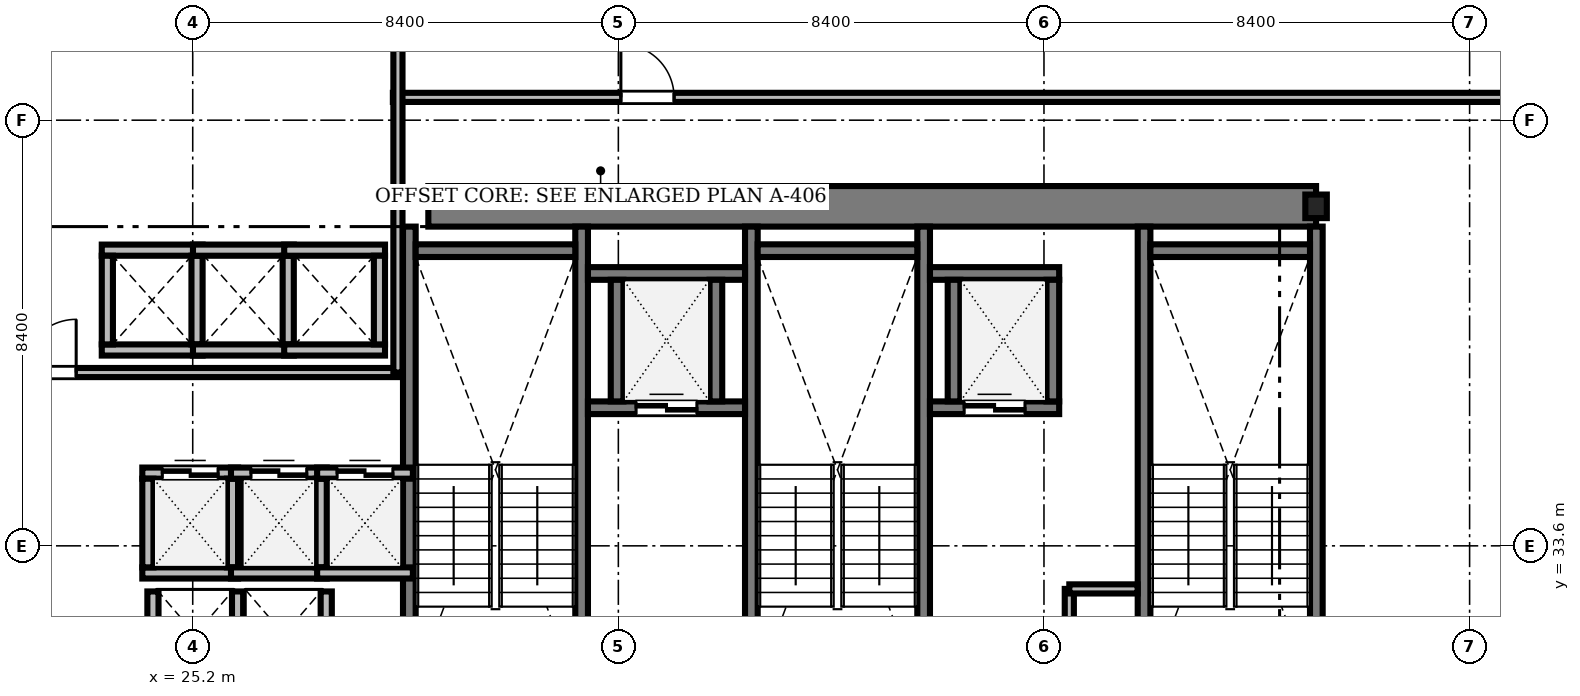
"""IFC4 building model, lengths in metres.
Left out: names, types, materials, properties, quantities, classifications, styles, units other than length and angle.
Written with IfcOpenShell. Run it as: python <this file> out.ifc"""

import sys

from ifc_helpers import new_model, si_unit, direction, frame, frame_2d, origin, origin_2d, place, context, subcontext, project, spatial, rectangle, i_section, extrude, source, transform, mapped, element, fill, save


model = new_model("IFC4")
c1 = context("Model", 3, precision=1e-05, world=origin(), true_north=direction((0.0, 1.0)))
c2 = subcontext(c1, "Body", "Model", "MODEL_VIEW")
j1 = project(units=[si_unit("LENGTHUNIT", "METRE"), si_unit("PLANEANGLEUNIT", "RADIAN")], contexts=[c1])
p1 = place(None, origin())
s1 = spatial("IfcSite", under=j1, at=p1, CompositionType="ELEMENT")
p2 = place(p1, origin())
s2 = spatial("IfcBuilding", under=s1, at=p2, CompositionType="ELEMENT")
p3 = place(p2, frame((0.0, 0.0, 103.7)))
s3 = spatial("IfcBuildingStorey", under=s2, at=p3, CompositionType="ELEMENT", Elevation=103.7)
m1 = source(origin(), c2, "Body", "SweptSolid", [
    extrude(rectangle(XDim=17.52, YDim=0.8, at=frame_2d((8.76, 0.0))), origin(), (0.0, 0.0, 1.0), 3.56),
])
p4 = place(p3, frame((29.85, 40.3, 0.0), z_axis=(0.0, 0.0, 1.0), x_axis=(1.0, 0.0, 0.0)))
e1 = element("IfcWall", 1, at=p4, inside=s3, PredefinedType="SHEAR", context=c2, shape_type="MappedRepresentation", body=[
    mapped(m1, transform((0.0, 0.0, 0.0), scale=1.0)),
])
m2 = source(origin(), c2, "Body", "SweptSolid", [
    extrude(i_section(OverallWidth=0.424, OverallDepth=0.465, WebThickness=0.035, FlangeThickness=0.056, FilletRadius=0.015, at=origin_2d()), origin(), (0.0, 0.0, 1.0), 3.56),
])
p5 = place(p3, frame((47.37, 40.3, 0.0), z_axis=(0.0, 0.0, 1.0), x_axis=(1.0, 0.0, 0.0)))
e2 = element("IfcColumn", 2, at=p5, inside=s3, PredefinedType="COLUMN", context=c2, shape_type="MappedRepresentation", body=[
    mapped(m2, transform((0.0, 0.0, 0.0), scale=1.0)),
])
m3 = source(origin(), c2, "Body", "SweptSolid", [
    extrude(rectangle(XDim=9.25, YDim=0.25, at=frame_2d((4.625, 0.0))), origin(), (0.0, 0.0, 1.0), 3.6),
])
for number, where, z_axis, x_axis in (
    (3, (29.475, 30.65, 0.0), (0.0, 0.0, 1.0), (0.0, 1.0, 0.0)),
    (4, (32.875, 30.65, 0.0), (0.0, 0.0, 1.0), (0.0, 1.0, 0.0)),
):
    element("IfcWall", number, at=place(p3, frame(where, z_axis=z_axis, x_axis=x_axis)), inside=s3, PredefinedType="SOLIDWALL", context=c2, shape_type="MappedRepresentation", body=[
        mapped(m3, transform((0.0, 0.0, 0.0), scale=1.0)),
    ])
m4 = source(origin(), c2, "Body", "SweptSolid", [
    extrude(rectangle(XDim=3.15, YDim=0.25, at=frame_2d((1.575, 0.0))), origin(), (0.0, 0.0, 1.0), 3.6),
])
p6 = place(p3, frame((29.6, 39.425, 0.0), z_axis=(0.0, 0.0, 1.0), x_axis=(1.0, 0.0, 0.0)))
e5 = element("IfcWall", 5, at=p6, inside=s3, PredefinedType="SOLIDWALL", context=c2, shape_type="MappedRepresentation", body=[
    mapped(m4, transform((0.0, 0.0, 0.0), scale=1.0)),
])
for number, where, z_axis, x_axis in (
    (6, (36.225, 30.65, 0.0), (0.0, 0.0, 1.0), (0.0, 1.0, 0.0)),
    (7, (39.625, 30.65, 0.0), (0.0, 0.0, 1.0), (0.0, 1.0, 0.0)),
):
    element("IfcWall", number, at=place(p3, frame(where, z_axis=z_axis, x_axis=x_axis)), inside=s3, PredefinedType="SOLIDWALL", context=c2, shape_type="MappedRepresentation", body=[
        mapped(m3, transform((0.0, 0.0, 0.0), scale=1.0)),
    ])
p7 = place(p3, frame((36.35, 39.425, 0.0), z_axis=(0.0, 0.0, 1.0), x_axis=(1.0, 0.0, 0.0)))
e8 = element("IfcWall", 8, at=p7, inside=s3, PredefinedType="SOLIDWALL", context=c2, shape_type="MappedRepresentation", body=[
    mapped(m4, transform((0.0, 0.0, 0.0), scale=1.0)),
])
for number, where, z_axis, x_axis in (
    (9, (43.975, 30.65, 0.0), (0.0, 0.0, 1.0), (0.0, 1.0, 0.0)),
    (10, (47.375, 30.65, 0.0), (0.0, 0.0, 1.0), (0.0, 1.0, 0.0)),
):
    element("IfcWall", number, at=place(p3, frame(where, z_axis=z_axis, x_axis=x_axis)), inside=s3, PredefinedType="SOLIDWALL", context=c2, shape_type="MappedRepresentation", body=[
        mapped(m3, transform((0.0, 0.0, 0.0), scale=1.0)),
    ])
p8 = place(p3, frame((44.1, 39.425, 0.0), z_axis=(0.0, 0.0, 1.0), x_axis=(1.0, 0.0, 0.0)))
e11 = element("IfcWall", 11, at=p8, inside=s3, PredefinedType="SOLIDWALL", context=c2, shape_type="MappedRepresentation", body=[
    mapped(m4, transform((0.0, 0.0, 0.0), scale=1.0)),
])
m5 = source(origin(), c2, "Body", "SweptSolid", [
    extrude(rectangle(XDim=1.99, YDim=0.22, at=frame_2d((0.995, 0.0))), origin(), (0.0, 0.0, 1.0), 3.56),
])
for number, where, z_axis, x_axis in (
    (12, (23.405, 37.465, 0.0), (0.0, 0.0, 1.0), (1.0, 0.0, 0.0)),
    (13, (23.405, 39.435, 0.0), (0.0, 0.0, 1.0), (1.0, 0.0, 0.0)),
):
    element("IfcWall", number, at=place(p3, frame(where, z_axis=z_axis, x_axis=x_axis)), inside=s3, PredefinedType="SOLIDWALL", context=c2, shape_type="MappedRepresentation", body=[
        mapped(m5, transform((0.0, 0.0, 0.0), scale=1.0)),
    ])
m6 = source(origin(), c2, "Body", "SweptSolid", [
    extrude(rectangle(XDim=1.75, YDim=0.22, at=frame_2d((0.875, 0.0))), origin(), (0.0, 0.0, 1.0), 3.56),
])
for number, where, z_axis, x_axis in (
    (14, (23.515, 37.575, 0.0), (0.0, 0.0, 1.0), (0.0, 1.0, 0.0)),
    (15, (25.285, 37.575, 0.0), (0.0, 0.0, 1.0), (0.0, 1.0, 0.0)),
):
    element("IfcWall", number, at=place(p3, frame(where, z_axis=z_axis, x_axis=x_axis)), inside=s3, PredefinedType="SOLIDWALL", context=c2, shape_type="MappedRepresentation", body=[
        mapped(m6, transform((0.0, 0.0, 0.0), scale=1.0)),
    ])
for number, where, z_axis, x_axis in (
    (16, (25.205, 37.465, 0.0), (0.0, 0.0, 1.0), (1.0, 0.0, 0.0)),
    (17, (25.205, 39.435, 0.0), (0.0, 0.0, 1.0), (1.0, 0.0, 0.0)),
):
    element("IfcWall", number, at=place(p3, frame(where, z_axis=z_axis, x_axis=x_axis)), inside=s3, PredefinedType="SOLIDWALL", context=c2, shape_type="MappedRepresentation", body=[
        mapped(m5, transform((0.0, 0.0, 0.0), scale=1.0)),
    ])
p9 = place(p3, frame((27.085, 37.575, 0.0), z_axis=(0.0, 0.0, 1.0), x_axis=(0.0, 1.0, 0.0)))
e18 = element("IfcWall", 18, at=p9, inside=s3, PredefinedType="SOLIDWALL", context=c2, shape_type="MappedRepresentation", body=[
    mapped(m6, transform((0.0, 0.0, 0.0), scale=1.0)),
])
m7 = source(origin(), c2, "Body", "SweptSolid", [
    extrude(rectangle(XDim=1.99, YDim=0.22, at=frame_2d((0.995, 0.0))), origin(), (0.0, 0.0, 1.0), 3.56),
])
for number, where, z_axis, x_axis in (
    (19, (27.005, 37.465, 0.0), (0.0, 0.0, 1.0), (1.0, 0.0, 0.0)),
    (20, (27.005, 39.435, 0.0), (0.0, 0.0, 1.0), (1.0, 0.0, 0.0)),
):
    element("IfcWall", number, at=place(p3, frame(where, z_axis=z_axis, x_axis=x_axis)), inside=s3, PredefinedType="SOLIDWALL", context=c2, shape_type="MappedRepresentation", body=[
        mapped(m7, transform((0.0, 0.0, 0.0), scale=1.0)),
    ])
p10 = place(p3, frame((28.885, 37.575, 0.0), z_axis=(0.0, 0.0, 1.0), x_axis=(0.0, 1.0, 0.0)))
e21 = element("IfcWall", 21, at=p10, inside=s3, PredefinedType="SOLIDWALL", context=c2, shape_type="MappedRepresentation", body=[
    mapped(m6, transform((0.0, 0.0, 0.0), scale=1.0)),
])
m8 = source(origin(), c2, "Body", "SweptSolid", [
    extrude(rectangle(XDim=1.89, YDim=0.22, at=frame_2d((0.945, 0.0))), origin(), (0.0, 0.0, 1.0), 3.56),
])
p11 = place(p3, frame((24.205, 33.065, 0.0), z_axis=(0.0, 0.0, 1.0), x_axis=(1.0, 0.0, 0.0)))
e22 = element("IfcWall", 22, at=p11, inside=s3, PredefinedType="SOLIDWALL", context=c2, shape_type="MappedRepresentation", body=[
    mapped(m8, transform((0.0, 0.0, 0.0), scale=1.0)),
])
p12 = place(p3, frame((24.205, 35.035, 0.0), z_axis=(0.0, 0.0, 1.0), x_axis=(1.0, 0.0, 0.0)))
e23 = element("IfcWall", 23, at=p12, inside=s3, PredefinedType="SOLIDWALL", context=c2, shape_type="MappedRepresentation", body=[
    mapped(m8, transform((0.0, 0.0, 0.0), scale=1.0)),
])
m9 = source(origin(), c2, "Body", "SweptSolid", [
    extrude(rectangle(XDim=1.1, YDim=2.2, at=frame_2d((0.55, 1.1))), frame((0.0, 0.12, 0.0), z_axis=(0.0, -1.0, 0.0), x_axis=(1.0, 0.0, 0.0)), (0.0, 0.0, 1.0), 0.24),
])
p13 = place(p12, frame((0.395, 0.0, 0.0)))
e24 = element("IfcOpeningElement", 24, at=p13, cuts=e23, PredefinedType="OPENING", context=c2, shape_type="MappedRepresentation", body=[
    mapped(m9, transform((0.0, 0.0, 0.0), scale=1.0)),
])
for number, where, z_axis, x_axis in (
    (25, (24.315, 33.175, 0.0), (0.0, 0.0, 1.0), (0.0, 1.0, 0.0)),
    (26, (25.985, 33.175, 0.0), (0.0, 0.0, 1.0), (0.0, 1.0, 0.0)),
):
    element("IfcWall", number, at=place(p3, frame(where, z_axis=z_axis, x_axis=x_axis)), inside=s3, PredefinedType="SOLIDWALL", context=c2, shape_type="MappedRepresentation", body=[
        mapped(m6, transform((0.0, 0.0, 0.0), scale=1.0)),
    ])
p14 = place(p3, frame((25.955, 33.065, 0.0), z_axis=(0.0, 0.0, 1.0), x_axis=(1.0, 0.0, 0.0)))
e27 = element("IfcWall", 27, at=p14, inside=s3, PredefinedType="SOLIDWALL", context=c2, shape_type="MappedRepresentation", body=[
    mapped(m8, transform((0.0, 0.0, 0.0), scale=1.0)),
])
p15 = place(p3, frame((25.955, 35.035, 0.0), z_axis=(0.0, 0.0, 1.0), x_axis=(1.0, 0.0, 0.0)))
e28 = element("IfcWall", 28, at=p15, inside=s3, PredefinedType="SOLIDWALL", context=c2, shape_type="MappedRepresentation", body=[
    mapped(m8, transform((0.0, 0.0, 0.0), scale=1.0)),
])
p16 = place(p15, frame((0.395, 0.0, 0.0)))
e29 = element("IfcOpeningElement", 29, at=p16, cuts=e28, PredefinedType="OPENING", context=c2, shape_type="MappedRepresentation", body=[
    mapped(m9, transform((0.0, 0.0, 0.0), scale=1.0)),
])
p17 = place(p3, frame((27.735, 33.175, 0.0), z_axis=(0.0, 0.0, 1.0), x_axis=(0.0, 1.0, 0.0)))
e30 = element("IfcWall", 30, at=p17, inside=s3, PredefinedType="SOLIDWALL", context=c2, shape_type="MappedRepresentation", body=[
    mapped(m6, transform((0.0, 0.0, 0.0), scale=1.0)),
])
p18 = place(p3, frame((27.655, 33.065, 0.0), z_axis=(0.0, 0.0, 1.0), x_axis=(1.0, 0.0, 0.0)))
e31 = element("IfcWall", 31, at=p18, inside=s3, PredefinedType="SOLIDWALL", context=c2, shape_type="MappedRepresentation", body=[
    mapped(m8, transform((0.0, 0.0, 0.0), scale=1.0)),
])
p19 = place(p3, frame((27.655, 35.035, 0.0), z_axis=(0.0, 0.0, 1.0), x_axis=(1.0, 0.0, 0.0)))
e32 = element("IfcWall", 32, at=p19, inside=s3, PredefinedType="SOLIDWALL", context=c2, shape_type="MappedRepresentation", body=[
    mapped(m8, transform((0.0, 0.0, 0.0), scale=1.0)),
])
p20 = place(p19, frame((0.395, 0.0, 0.0)))
e33 = element("IfcOpeningElement", 33, at=p20, cuts=e32, PredefinedType="OPENING", context=c2, shape_type="MappedRepresentation", body=[
    mapped(m9, transform((0.0, 0.0, 0.0), scale=1.0)),
])
m10 = source(origin(), c2, "Body", "SweptSolid", [
    extrude(rectangle(XDim=3.1, YDim=0.25, at=frame_2d((1.55, 0.0))), origin(), (0.0, 0.0, 1.0), 3.56),
])
p21 = place(p3, frame((33.0, 36.325, 0.0), z_axis=(0.0, 0.0, 1.0), x_axis=(1.0, 0.0, 0.0)))
e34 = element("IfcWall", 34, at=p21, inside=s3, PredefinedType="SOLIDWALL", context=c2, shape_type="MappedRepresentation", body=[
    mapped(m10, transform((0.0, 0.0, 0.0), scale=1.0)),
])
m11 = source(origin(), c2, "Body", "SweptSolid", [
    extrude(rectangle(XDim=1.2, YDim=2.25, at=frame_2d((0.6, 1.125))), frame((0.0, 0.135, 0.0), z_axis=(0.0, -1.0, 0.0), x_axis=(1.0, 0.0, 0.0)), (0.0, 0.0, 1.0), 0.27),
])
p22 = place(p21, frame((0.95, 0.0, 0.0)))
e35 = element("IfcOpeningElement", 35, at=p22, cuts=e34, PredefinedType="OPENING", context=c2, shape_type="MappedRepresentation", body=[
    mapped(m11, transform((0.0, 0.0, 0.0), scale=1.0)),
])
p23 = place(p3, frame((33.0, 38.975, 0.0), z_axis=(0.0, 0.0, 1.0), x_axis=(1.0, 0.0, 0.0)))
e36 = element("IfcWall", 36, at=p23, inside=s3, PredefinedType="SOLIDWALL", context=c2, shape_type="MappedRepresentation", body=[
    mapped(m10, transform((0.0, 0.0, 0.0), scale=1.0)),
])
m12 = source(origin(), c2, "Body", "SweptSolid", [
    extrude(rectangle(XDim=2.4, YDim=0.25, at=frame_2d((1.2, 0.0))), origin(), (0.0, 0.0, 1.0), 3.56),
])
for number, where, z_axis, x_axis in (
    (37, (33.575, 36.45, 0.0), (0.0, 0.0, 1.0), (0.0, 1.0, 0.0)),
    (38, (35.525, 36.45, 0.0), (0.0, 0.0, 1.0), (0.0, 1.0, 0.0)),
):
    element("IfcWall", number, at=place(p3, frame(where, z_axis=z_axis, x_axis=x_axis)), inside=s3, PredefinedType="SOLIDWALL", context=c2, shape_type="MappedRepresentation", body=[
        mapped(m12, transform((0.0, 0.0, 0.0), scale=1.0)),
    ])
m13 = source(origin(), c2, "Body", "SweptSolid", [
    extrude(rectangle(XDim=2.55, YDim=0.25, at=frame_2d((1.275, 0.0))), origin(), (0.0, 0.0, 1.0), 3.56),
])
p24 = place(p3, frame((39.75, 36.325, 0.0), z_axis=(0.0, 0.0, 1.0), x_axis=(1.0, 0.0, 0.0)))
e39 = element("IfcWall", 39, at=p24, inside=s3, PredefinedType="SOLIDWALL", context=c2, shape_type="MappedRepresentation", body=[
    mapped(m13, transform((0.0, 0.0, 0.0), scale=1.0)),
])
p25 = place(p24, frame((0.675, 0.0, 0.0)))
e40 = element("IfcOpeningElement", 40, at=p25, cuts=e39, PredefinedType="OPENING", context=c2, shape_type="MappedRepresentation", body=[
    mapped(m11, transform((0.0, 0.0, 0.0), scale=1.0)),
])
p26 = place(p3, frame((39.75, 38.975, 0.0), z_axis=(0.0, 0.0, 1.0), x_axis=(1.0, 0.0, 0.0)))
e41 = element("IfcWall", 41, at=p26, inside=s3, PredefinedType="SOLIDWALL", context=c2, shape_type="MappedRepresentation", body=[
    mapped(m13, transform((0.0, 0.0, 0.0), scale=1.0)),
])
for number, where, z_axis, x_axis in (
    (42, (40.225, 36.45, 0.0), (0.0, 0.0, 1.0), (0.0, 1.0, 0.0)),
    (43, (42.175, 36.45, 0.0), (0.0, 0.0, 1.0), (0.0, 1.0, 0.0)),
):
    element("IfcWall", number, at=place(p3, frame(where, z_axis=z_axis, x_axis=x_axis)), inside=s3, PredefinedType="SOLIDWALL", context=c2, shape_type="MappedRepresentation", body=[
        mapped(m12, transform((0.0, 0.0, 0.0), scale=1.0)),
    ])
m14 = source(origin(), c2, "Body", "SweptSolid", [
    extrude(rectangle(XDim=1.7, YDim=0.22, at=frame_2d((0.85, 0.0))), origin(), (0.0, 0.0, 1.0), 3.56),
])
for number, where, z_axis, x_axis in (
    (44, (24.415, 31.0, 0.0), (0.0, 0.0, 1.0), (0.0, 1.0, 0.0)),
    (45, (26.085, 31.0, 0.0), (0.0, 0.0, 1.0), (0.0, 1.0, 0.0)),
    (46, (27.835, 31.0, 0.0), (0.0, 0.0, 1.0), (0.0, 1.0, 0.0)),
):
    element("IfcWall", number, at=place(p3, frame(where, z_axis=z_axis, x_axis=x_axis)), inside=s3, PredefinedType="SOLIDWALL", context=c2, shape_type="MappedRepresentation", body=[
        mapped(m14, transform((0.0, 0.0, 0.0), scale=1.0)),
    ])
m15 = source(origin(), c2, "Body", "SweptSolid", [
    extrude(rectangle(XDim=23.928, YDim=0.18, at=frame_2d((11.964, 0.0))), origin(), (0.0, 0.0, 1.0), 2.802),
])
p27 = place(p3, frame((29.15, 42.45, 0.0), z_axis=(0.0, 0.0, 1.0), x_axis=(1.0, 0.0, 0.0)))
e47 = element("IfcWall", 47, at=p27, inside=s3, PredefinedType="PARTITIONING", context=c2, shape_type="MappedRepresentation", body=[
    mapped(m15, transform((0.0, 0.0, 0.0), scale=1.0)),
])
m16 = source(origin(), c2, "Body", "SweptSolid", [
    extrude(rectangle(XDim=1.05, YDim=2.2, at=frame_2d((0.525, 1.1))), frame((0.0, 0.1, 0.0), z_axis=(0.0, -1.0, 0.0), x_axis=(1.0, 0.0, 0.0)), (0.0, 0.0, 1.0), 0.2),
])
p28 = place(p27, frame((4.5, 0.0, 0.0)))
e48 = element("IfcOpeningElement", 48, at=p28, cuts=e47, PredefinedType="OPENING", context=c2, shape_type="MappedRepresentation", body=[
    mapped(m16, transform((0.0, 0.0, 0.0), scale=1.0)),
])
m17 = source(origin(), c2, "Body", "SweptSolid", [
    extrude(rectangle(XDim=22.328, YDim=0.18, at=frame_2d((11.164, 0.0))), origin(), (0.0, 0.0, 1.0), 2.802),
])
p29 = place(p3, frame((6.922, 37.02, 0.0), z_axis=(0.0, 0.0, 1.0), x_axis=(1.0, 0.0, 0.0)))
e49 = element("IfcWall", 49, at=p29, inside=s3, PredefinedType="PARTITIONING", context=c2, shape_type="MappedRepresentation", body=[
    mapped(m17, transform((0.0, 0.0, 0.0), scale=1.0)),
])
p30 = place(p29, frame((14.928, 0.0, 0.0)))
e50 = element("IfcOpeningElement", 50, at=p30, cuts=e49, PredefinedType="OPENING", context=c2, shape_type="MappedRepresentation", body=[
    mapped(m16, transform((0.0, 0.0, 0.0), scale=1.0)),
])
m18 = source(origin(), c2, "Body", "SweptSolid", [
    extrude(rectangle(XDim=11.45, YDim=0.18, at=frame_2d((5.725, 0.0))), origin(), (0.0, 0.0, 1.0), 2.802),
])
p31 = place(p3, frame((29.25, 37.02, 0.0), z_axis=(0.0, 0.0, 1.0), x_axis=(0.0, 1.0, 0.0)))
e51 = element("IfcWall", 51, at=p31, inside=s3, PredefinedType="PARTITIONING", context=c2, shape_type="MappedRepresentation", body=[
    mapped(m18, transform((0.0, 0.0, 0.0), scale=1.0)),
])
m19 = source(origin(), c2, "Body", "SweptSolid", [
    extrude(rectangle(XDim=1.858, YDim=0.18, at=frame_2d((0.929, 0.0))), origin(), (0.0, 0.0, 1.0), 3.56),
])
p32 = place(p3, frame((42.5, 30.892, 0.0), z_axis=(0.0, 0.0, 1.0), x_axis=(0.0, 1.0, 0.0)))
e52 = element("IfcWall", 52, at=p32, inside=s3, PredefinedType="PARTITIONING", context=c2, shape_type="MappedRepresentation", body=[
    mapped(m19, transform((0.0, 0.0, 0.0), scale=1.0)),
])
m20 = source(origin(), c2, "Body", "SweptSolid", [
    extrude(rectangle(XDim=1.348, YDim=0.18, at=frame_2d((0.674, 0.0))), origin(), (0.0, 0.0, 1.0), 3.56),
])
p33 = place(p3, frame((42.5, 32.75, 0.0), z_axis=(0.0, 0.0, 1.0), x_axis=(1.0, 0.0, 0.0)))
e53 = element("IfcWall", 53, at=p33, inside=s3, PredefinedType="PARTITIONING", context=c2, shape_type="MappedRepresentation", body=[
    mapped(m20, transform((0.0, 0.0, 0.0), scale=1.0)),
])
m21 = source(origin(), c2, "Body", "SweptSolid", [
    extrude(rectangle(XDim=1.1, YDim=2.2, at=frame_2d((0.55, 1.1))), frame((0.0, 0.025, 0.0), z_axis=(0.0, -1.0, 0.0), x_axis=(1.0, 0.0, 0.0)), (0.0, 0.0, 1.0), 0.05),
])
p34 = place(p13, origin())
e54 = element("IfcDoor", 54, at=p34, inside=s3, OperationType="DOUBLE_DOOR_SLIDING", PredefinedType="DOOR", context=c2, shape_type="MappedRepresentation", body=[
    mapped(m21, transform((0.0, 0.0, 0.0), scale=1.0)),
])
fill(e24, e54)
p35 = place(p16, origin())
e55 = element("IfcDoor", 55, at=p35, inside=s3, OperationType="DOUBLE_DOOR_SLIDING", PredefinedType="DOOR", context=c2, shape_type="MappedRepresentation", body=[
    mapped(m21, transform((0.0, 0.0, 0.0), scale=1.0)),
])
fill(e29, e55)
p36 = place(p20, origin())
e56 = element("IfcDoor", 56, at=p36, inside=s3, OperationType="DOUBLE_DOOR_SLIDING", PredefinedType="DOOR", context=c2, shape_type="MappedRepresentation", body=[
    mapped(m21, transform((0.0, 0.0, 0.0), scale=1.0)),
])
fill(e33, e56)
m22 = source(origin(), c2, "Body", "SweptSolid", [
    extrude(rectangle(XDim=1.2, YDim=2.25, at=frame_2d((0.6, 1.125))), frame((0.0, 0.025, 0.0), z_axis=(0.0, -1.0, 0.0), x_axis=(1.0, 0.0, 0.0)), (0.0, 0.0, 1.0), 0.05),
])
p37 = place(p22, origin())
e57 = element("IfcDoor", 57, at=p37, inside=s3, OperationType="DOUBLE_DOOR_SLIDING", PredefinedType="DOOR", context=c2, shape_type="MappedRepresentation", body=[
    mapped(m22, transform((0.0, 0.0, 0.0), scale=1.0)),
])
fill(e35, e57)
p38 = place(p25, origin())
e58 = element("IfcDoor", 58, at=p38, inside=s3, OperationType="DOUBLE_DOOR_SLIDING", PredefinedType="DOOR", context=c2, shape_type="MappedRepresentation", body=[
    mapped(m22, transform((0.0, 0.0, 0.0), scale=1.0)),
])
fill(e40, e58)
m23 = source(origin(), c2, "Body", "SweptSolid", [
    extrude(rectangle(XDim=1.05, YDim=2.2, at=frame_2d((0.525, 1.1))), frame((0.0, 0.025, 0.0), z_axis=(0.0, -1.0, 0.0), x_axis=(1.0, 0.0, 0.0)), (0.0, 0.0, 1.0), 0.05),
])
p39 = place(p28, origin())
e59 = element("IfcDoor", 59, at=p39, inside=s3, OperationType="SINGLE_SWING_LEFT", PredefinedType="DOOR", context=c2, shape_type="MappedRepresentation", body=[
    mapped(m23, transform((0.0, 0.0, 0.0), scale=1.0)),
])
fill(e48, e59)
p40 = place(p30, origin())
e60 = element("IfcDoor", 60, at=p40, inside=s3, OperationType="SINGLE_SWING_RIGHT", PredefinedType="DOOR", context=c2, shape_type="MappedRepresentation", body=[
    mapped(m23, transform((0.0, 0.0, 0.0), scale=1.0)),
])
fill(e50, e60)
save(model, sys.argv[1])
